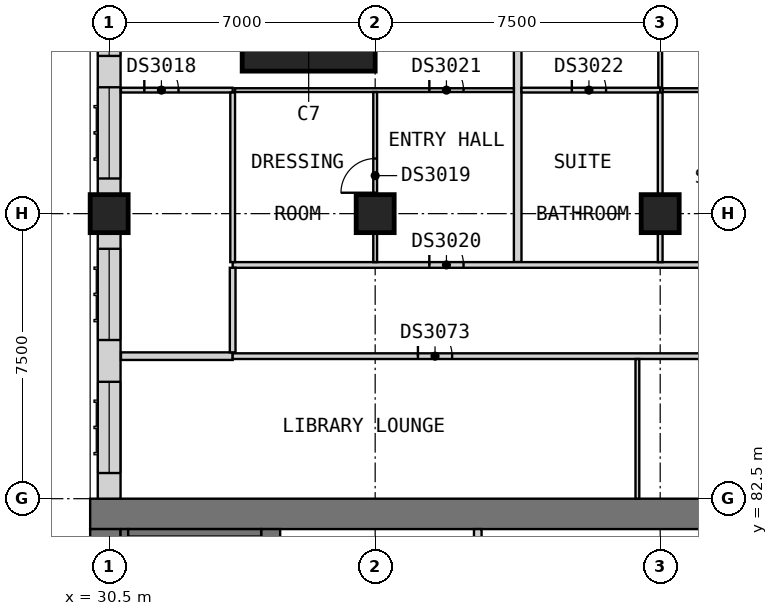
"""IFC4 building model, lengths in metres.
Left out: names, types, materials, properties, quantities, classifications, styles, units other than length and angle.
Written with IfcOpenShell. Run it as: python <this file> out.ifc"""

import sys

from ifc_helpers import new_model, si_unit, direction, frame, frame_2d, origin, origin_2d, place, context, subcontext, project, spatial, rectangle, extrude, element, fill, save


model = new_model("IFC4")
c1 = context("Model", 3, precision=1e-05, world=origin(), true_north=direction((0.0, 1.0)))
c2 = subcontext(c1, "Body", "Model", "MODEL_VIEW")
j1 = project(units=[si_unit("LENGTHUNIT", "METRE"), si_unit("PLANEANGLEUNIT", "RADIAN")], contexts=[c1])
p1 = place(None, origin())
s1 = spatial("IfcSite", under=j1, at=p1, CompositionType="ELEMENT")
p2 = place(p1, origin())
s2 = spatial("IfcBuilding", under=s1, at=p2, CompositionType="ELEMENT")
p3 = place(p2, frame((0.0, 0.0, 137.4)))
s3 = spatial("IfcBuildingStorey", under=s2, at=p3, CompositionType="ELEMENT", Elevation=137.4)
for number, where, z_axis, x_axis in (
    (1, (30.5, 90.0, 0.0), (0.0, 0.0, 1.0), (1.0, 0.0, 0.0)),
    (2, (37.5, 90.0, 0.0), (0.0, 0.0, 1.0), (1.0, 0.0, 0.0)),
    (3, (45.0, 90.0, 0.0), (0.0, 0.0, 1.0), (1.0, 0.0, 0.0)),
):
    element("IfcColumn", number, at=place(p3, frame(where, z_axis=z_axis, x_axis=x_axis)), inside=s3, PredefinedType="COLUMN", context=c2, shape_type="SweptSolid", body=[
        extrude(rectangle(XDim=1.0, YDim=1.0, at=origin_2d()), origin(), (0.0, 0.0, 1.0), 3.6),
    ])
p4 = place(p3, frame((35.75, 95.5, 0.0), z_axis=(0.0, 0.0, 1.0), x_axis=(1.0, 0.0, 0.0)))
e4 = element("IfcColumn", 4, at=p4, inside=s3, PredefinedType="COLUMN", context=c2, shape_type="SweptSolid", body=[
    extrude(rectangle(XDim=3.5, YDim=3.5, at=origin_2d()), origin(), (0.0, 0.0, 1.0), 3.6),
])
p5 = place(p3, frame((30.0, 82.1, 0.0), z_axis=(0.0, 0.0, 1.0), x_axis=(1.0, 0.0, 0.0)))
e5 = element("IfcWall", 5, at=p5, inside=s3, PredefinedType="SHEAR", context=c2, shape_type="SweptSolid", body=[
    extrude(rectangle(XDim=30.0, YDim=0.8, at=frame_2d((15.0, 0.0))), origin(), (0.0, 0.0, 1.0), 3.6),
])
p6 = place(p3, frame((30.4, 60.8, 0.0), z_axis=(0.0, 0.0, 1.0), x_axis=(0.0, 1.0, 0.0)))
e6 = element("IfcWall", 6, at=p6, inside=s3, PredefinedType="SHEAR", context=c2, shape_type="SweptSolid", body=[
    extrude(rectangle(XDim=20.9, YDim=0.8, at=frame_2d((10.45, 0.0))), origin(), (0.0, 0.0, 1.0), 3.6),
])
p7 = place(p3, frame((34.75, 78.3, 0.0), z_axis=(0.0, 0.0, 1.0), x_axis=(0.0, 1.0, 0.0)))
e7 = element("IfcWall", 7, at=p7, inside=s3, PredefinedType="SHEAR", context=c2, shape_type="SweptSolid", body=[
    extrude(rectangle(XDim=3.4, YDim=0.5, at=frame_2d((1.7, 0.0))), origin(), (0.0, 0.0, 1.0), 3.6),
])
p8 = place(p3, frame((30.5, 97.25, 0.0), z_axis=(0.0, 0.0, 1.0), x_axis=(0.0, -1.0, 0.0)))
e8 = element("IfcWall", 8, at=p8, inside=s3, PredefinedType="SOLIDWALL", context=c2, shape_type="SweptSolid", body=[
    extrude(rectangle(XDim=6.75, YDim=0.6, at=frame_2d((3.375, 0.0))), origin(), (0.0, 0.0, 1.0), 2.85),
])
p9 = place(p8, frame((3.925, 0.0, 0.8)))
e9 = element("IfcOpeningElement", 9, at=p9, cuts=e8, PredefinedType="OPENING", context=c2, shape_type="SweptSolid", body=[
    extrude(rectangle(XDim=2.4, YDim=1.8, at=frame_2d((1.2, 0.9))), frame((0.0, 0.31, 0.0), z_axis=(0.0, -1.0, 0.0), x_axis=(1.0, 0.0, 0.0)), (0.0, 0.0, 1.0), 0.62),
])
p10 = place(p8, frame((1.3, 0.0, 0.8)))
e10 = element("IfcOpeningElement", 10, at=p10, cuts=e8, PredefinedType="OPENING", context=c2, shape_type="SweptSolid", body=[
    extrude(rectangle(XDim=1.8, YDim=1.8, at=frame_2d((0.9, 0.9))), frame((0.0, 0.31, 0.0), z_axis=(0.0, -1.0, 0.0), x_axis=(1.0, 0.0, 0.0)), (0.0, 0.0, 1.0), 0.62),
])
p11 = place(p3, frame((30.5, 89.5, 0.0), z_axis=(0.0, 0.0, 1.0), x_axis=(0.0, -1.0, 0.0)))
e11 = element("IfcWall", 11, at=p11, inside=s3, PredefinedType="SOLIDWALL", context=c2, shape_type="SweptSolid", body=[
    extrude(rectangle(XDim=7.0, YDim=0.6, at=frame_2d((3.5, 0.0))), origin(), (0.0, 0.0, 1.0), 3.35),
])
p12 = place(p11, frame((3.925, 0.0, 0.8)))
e12 = element("IfcOpeningElement", 12, at=p12, cuts=e11, PredefinedType="OPENING", context=c2, shape_type="SweptSolid", body=[
    extrude(rectangle(XDim=2.4, YDim=1.8, at=frame_2d((1.2, 0.9))), frame((0.0, 0.31, 0.0), z_axis=(0.0, -1.0, 0.0), x_axis=(1.0, 0.0, 0.0)), (0.0, 0.0, 1.0), 0.62),
])
p13 = place(p11, frame((0.425, 0.0, 0.8)))
e13 = element("IfcOpeningElement", 13, at=p13, cuts=e11, PredefinedType="OPENING", context=c2, shape_type="SweptSolid", body=[
    extrude(rectangle(XDim=2.4, YDim=1.8, at=frame_2d((1.2, 0.9))), frame((0.0, 0.31, 0.0), z_axis=(0.0, -1.0, 0.0), x_axis=(1.0, 0.0, 0.0)), (0.0, 0.0, 1.0), 0.62),
])
p14 = place(p3, frame((40.2, 78.5, 0.0), z_axis=(0.0, 0.0, 1.0), x_axis=(0.0, 1.0, 0.0)))
e14 = element("IfcWall", 14, at=p14, inside=s3, PredefinedType="SOLIDWALL", context=c2, shape_type="SweptSolid", body=[
    extrude(rectangle(XDim=3.2, YDim=0.2, at=frame_2d((1.6, 0.0))), origin(), (0.0, 0.0, 1.0), 3.6),
])
p15 = place(p3, frame((30.9, 60.8, 0.0), z_axis=(0.0, 0.0, 1.0), x_axis=(0.0, 1.0, 0.0)))
e15 = element("IfcWall", 15, at=p15, inside=s3, PredefinedType="SOLIDWALL", context=c2, shape_type="SweptSolid", body=[
    extrude(rectangle(XDim=20.9, YDim=0.2, at=frame_2d((10.45, 0.0))), origin(), (0.0, 0.0, 1.0), 3.35),
])
p16 = place(p3, frame((31.0, 81.6, 0.0), z_axis=(0.0, 0.0, 1.0), x_axis=(1.0, 0.0, 0.0)))
e16 = element("IfcWall", 16, at=p16, inside=s3, PredefinedType="SOLIDWALL", context=c2, shape_type="SweptSolid", body=[
    extrude(rectangle(XDim=3.5, YDim=0.2, at=frame_2d((1.75, 0.0))), origin(), (0.0, 0.0, 1.0), 3.35),
])
p17 = place(p3, frame((30.81, 86.25, 0.0), z_axis=(0.0, 0.0, 1.0), x_axis=(1.0, 0.0, 0.0)))
e17 = element("IfcWall", 17, at=p17, inside=s3, PredefinedType="PARTITIONING", context=c2, shape_type="SweptSolid", body=[
    extrude(rectangle(XDim=2.94, YDim=0.2, at=frame_2d((1.47, 0.0))), origin(), (0.0, 0.0, 1.0), 3.35),
])
p18 = place(p3, frame((41.25, 88.725, 0.0), z_axis=(0.0, 0.0, 1.0), x_axis=(0.0, 1.0, 0.0)))
e18 = element("IfcWall", 18, at=p18, inside=s3, PredefinedType="PARTITIONING", context=c2, shape_type="SweptSolid", body=[
    extrude(rectangle(XDim=11.715, YDim=0.2, at=frame_2d((5.857, 0.0))), origin(), (0.0, 0.0, 1.0), 3.35),
])
p19 = place(p3, frame((33.75, 86.25, 0.0), z_axis=(0.0, 0.0, 1.0), x_axis=(1.0, 0.0, 0.0)))
e19 = element("IfcWall", 19, at=p19, inside=s3, PredefinedType="PARTITIONING", context=c2, shape_type="SweptSolid", body=[
    extrude(rectangle(XDim=37.5, YDim=0.15, at=frame_2d((18.75, 0.0))), origin(), (0.0, 0.0, 1.0), 3.35),
])
p20 = place(p19, frame((4.875, 0.0, 0.0)))
e20 = element("IfcOpeningElement", 20, at=p20, cuts=e19, PredefinedType="OPENING", context=c2, shape_type="SweptSolid", body=[
    extrude(rectangle(XDim=0.9, YDim=2.1, at=frame_2d((0.45, 1.05))), frame((0.0, 0.085, 0.0), z_axis=(0.0, -1.0, 0.0), x_axis=(1.0, 0.0, 0.0)), (0.0, 0.0, 1.0), 0.17),
])
p21 = place(p3, frame((33.75, 88.65, 0.0), z_axis=(0.0, 0.0, 1.0), x_axis=(1.0, 0.0, 0.0)))
e21 = element("IfcWall", 21, at=p21, inside=s3, PredefinedType="PARTITIONING", context=c2, shape_type="SweptSolid", body=[
    extrude(rectangle(XDim=39.9, YDim=0.15, at=frame_2d((19.95, 0.0))), origin(), (0.0, 0.0, 1.0), 3.35),
])
p22 = place(p21, frame((5.175, 0.0, 0.0)))
e22 = element("IfcOpeningElement", 22, at=p22, cuts=e21, PredefinedType="OPENING", context=c2, shape_type="SweptSolid", body=[
    extrude(rectangle(XDim=0.9, YDim=2.1, at=frame_2d((0.45, 1.05))), frame((0.0, 0.085, 0.0), z_axis=(0.0, -1.0, 0.0), x_axis=(1.0, 0.0, 0.0)), (0.0, 0.0, 1.0), 0.17),
])
p23 = place(p21, frame((13.05, 0.0, 0.0)))
e23 = element("IfcOpeningElement", 23, at=p23, cuts=e21, PredefinedType="OPENING", context=c2, shape_type="SweptSolid", body=[
    extrude(rectangle(XDim=0.9, YDim=2.1, at=frame_2d((0.45, 1.05))), frame((0.0, 0.085, 0.0), z_axis=(0.0, -1.0, 0.0), x_axis=(1.0, 0.0, 0.0)), (0.0, 0.0, 1.0), 0.17),
])
p24 = place(p21, frame((28.05, 0.0, 0.0)))
e24 = element("IfcOpeningElement", 24, at=p24, cuts=e21, PredefinedType="OPENING", context=c2, shape_type="SweptSolid", body=[
    extrude(rectangle(XDim=0.9, YDim=2.1, at=frame_2d((0.45, 1.05))), frame((0.0, 0.085, 0.0), z_axis=(0.0, -1.0, 0.0), x_axis=(1.0, 0.0, 0.0)), (0.0, 0.0, 1.0), 0.17),
])
p25 = place(p21, frame((32.262, 0.0, 0.0)))
e25 = element("IfcOpeningElement", 25, at=p25, cuts=e21, PredefinedType="OPENING", context=c2, shape_type="SweptSolid", body=[
    extrude(rectangle(XDim=0.9, YDim=2.1, at=frame_2d((0.45, 1.05))), frame((0.0, 0.085, 0.0), z_axis=(0.0, -1.0, 0.0), x_axis=(1.0, 0.0, 0.0)), (0.0, 0.0, 1.0), 0.17),
])
p26 = place(p21, frame((36.113, 0.0, 0.0)))
e26 = element("IfcOpeningElement", 26, at=p26, cuts=e21, PredefinedType="OPENING", context=c2, shape_type="SweptSolid", body=[
    extrude(rectangle(XDim=0.9, YDim=2.1, at=frame_2d((0.45, 1.05))), frame((0.0, 0.085, 0.0), z_axis=(0.0, -1.0, 0.0), x_axis=(1.0, 0.0, 0.0)), (0.0, 0.0, 1.0), 0.17),
])
p27 = place(p21, frame((38.25, 0.0, 0.0)))
e27 = element("IfcOpeningElement", 27, at=p27, cuts=e21, PredefinedType="OPENING", context=c2, shape_type="SweptSolid", body=[
    extrude(rectangle(XDim=0.9, YDim=2.1, at=frame_2d((0.45, 1.05))), frame((0.0, 0.085, 0.0), z_axis=(0.0, -1.0, 0.0), x_axis=(1.0, 0.0, 0.0)), (0.0, 0.0, 1.0), 0.17),
])
p28 = place(p3, frame((33.75, 86.35, 0.0), z_axis=(0.0, 0.0, 1.0), x_axis=(0.0, 1.0, 0.0)))
e28 = element("IfcWall", 28, at=p28, inside=s3, PredefinedType="PARTITIONING", context=c2, shape_type="SweptSolid", body=[
    extrude(rectangle(XDim=2.225, YDim=0.15, at=frame_2d((1.112, 0.0))), origin(), (0.0, 0.0, 1.0), 3.35),
])
p29 = place(p3, frame((33.812, 93.25, 0.0), z_axis=(0.0, 0.0, 1.0), x_axis=(1.0, 0.0, 0.0)))
e29 = element("IfcWall", 29, at=p29, inside=s3, PredefinedType="PARTITIONING", context=c2, shape_type="SweptSolid", body=[
    extrude(rectangle(XDim=7.337, YDim=0.1, at=frame_2d((3.669, 0.0))), origin(), (0.0, 0.0, 1.0), 3.35),
])
p30 = place(p29, frame((5.113, 0.0, 0.0)))
e30 = element("IfcOpeningElement", 30, at=p30, cuts=e29, PredefinedType="OPENING", context=c2, shape_type="SweptSolid", body=[
    extrude(rectangle(XDim=0.9, YDim=2.1, at=frame_2d((0.45, 1.05))), frame((0.0, 0.06, 0.0), z_axis=(0.0, -1.0, 0.0), x_axis=(1.0, 0.0, 0.0)), (0.0, 0.0, 1.0), 0.12),
])
p31 = place(p3, frame((45.062, 93.25, 0.0), z_axis=(0.0, 0.0, 1.0), x_axis=(1.0, 0.0, 0.0)))
e31 = element("IfcWall", 31, at=p31, inside=s3, PredefinedType="PARTITIONING", context=c2, shape_type="SweptSolid", body=[
    extrude(rectangle(XDim=4.375, YDim=0.1, at=frame_2d((2.188, 0.0))), origin(), (0.0, 0.0, 1.0), 3.35),
])
p32 = place(p31, frame((1.738, 0.0, 0.0)))
e32 = element("IfcOpeningElement", 32, at=p32, cuts=e31, PredefinedType="OPENING", context=c2, shape_type="SweptSolid", body=[
    extrude(rectangle(XDim=0.9, YDim=2.1, at=frame_2d((0.45, 1.05))), frame((0.0, 0.06, 0.0), z_axis=(0.0, -1.0, 0.0), x_axis=(1.0, 0.0, 0.0)), (0.0, 0.0, 1.0), 0.12),
])
p33 = place(p3, frame((37.5, 88.725, 0.0), z_axis=(0.0, 0.0, 1.0), x_axis=(0.0, 1.0, 0.0)))
e33 = element("IfcWall", 33, at=p33, inside=s3, PredefinedType="PARTITIONING", context=c2, shape_type="SweptSolid", body=[
    extrude(rectangle(XDim=4.475, YDim=0.1, at=frame_2d((2.237, 0.0))), origin(), (0.0, 0.0, 1.0), 3.35),
])
p34 = place(p33, frame((1.825, 0.0, 0.0)))
e34 = element("IfcOpeningElement", 34, at=p34, cuts=e33, PredefinedType="OPENING", context=c2, shape_type="SweptSolid", body=[
    extrude(rectangle(XDim=0.9, YDim=2.1, at=frame_2d((0.45, 1.05))), frame((0.0, 0.06, 0.0), z_axis=(0.0, -1.0, 0.0), x_axis=(1.0, 0.0, 0.0)), (0.0, 0.0, 1.0), 0.12),
])
p35 = place(p3, frame((44.4, 82.5, 0.0), z_axis=(0.0, 0.0, 1.0), x_axis=(0.0, 1.0, 0.0)))
e35 = element("IfcWall", 35, at=p35, inside=s3, PredefinedType="PARTITIONING", context=c2, shape_type="SweptSolid", body=[
    extrude(rectangle(XDim=3.675, YDim=0.1, at=frame_2d((1.837, 0.0))), origin(), (0.0, 0.0, 1.0), 3.35),
])
p36 = place(p3, frame((45.0, 93.312, 0.0), z_axis=(0.0, 0.0, 1.0), x_axis=(0.0, 1.0, 0.0)))
e36 = element("IfcWall", 36, at=p36, inside=s3, PredefinedType="PARTITIONING", context=c2, shape_type="SweptSolid", body=[
    extrude(rectangle(XDim=7.938, YDim=0.1, at=frame_2d((3.969, 0.0))), origin(), (0.0, 0.0, 1.0), 3.35),
])
p37 = place(p36, frame((4.238, 0.0, 0.0)))
e37 = element("IfcOpeningElement", 37, at=p37, cuts=e36, PredefinedType="OPENING", context=c2, shape_type="SweptSolid", body=[
    extrude(rectangle(XDim=0.9, YDim=2.1, at=frame_2d((0.45, 1.05))), frame((0.0, 0.06, 0.0), z_axis=(0.0, -1.0, 0.0), x_axis=(1.0, 0.0, 0.0)), (0.0, 0.0, 1.0), 0.12),
])
p38 = place(p3, frame((30.81, 93.25, 0.0), z_axis=(0.0, 0.0, 1.0), x_axis=(1.0, 0.0, 0.0)))
e38 = element("IfcWall", 38, at=p38, inside=s3, PredefinedType="PARTITIONING", context=c2, shape_type="SweptSolid", body=[
    extrude(rectangle(XDim=2.94, YDim=0.125, at=frame_2d((1.47, 0.0))), origin(), (0.0, 0.0, 1.0), 3.35),
])
p39 = place(p38, frame((0.615, 0.0, 0.0)))
e39 = element("IfcOpeningElement", 39, at=p39, cuts=e38, PredefinedType="OPENING", context=c2, shape_type="SweptSolid", body=[
    extrude(rectangle(XDim=0.9, YDim=2.1, at=frame_2d((0.45, 1.05))), frame((0.0, 0.073, 0.0), z_axis=(0.0, -1.0, 0.0), x_axis=(1.0, 0.0, 0.0)), (0.0, 0.0, 1.0), 0.145),
])
p40 = place(p3, frame((41.35, 93.25, 0.0), z_axis=(0.0, 0.0, 1.0), x_axis=(1.0, 0.0, 0.0)))
e40 = element("IfcWall", 40, at=p40, inside=s3, PredefinedType="PARTITIONING", context=c2, shape_type="SweptSolid", body=[
    extrude(rectangle(XDim=3.65, YDim=0.125, at=frame_2d((1.825, 0.0))), origin(), (0.0, 0.0, 1.0), 3.35),
])
p41 = place(p40, frame((1.325, 0.0, 0.0)))
e41 = element("IfcOpeningElement", 41, at=p41, cuts=e40, PredefinedType="OPENING", context=c2, shape_type="SweptSolid", body=[
    extrude(rectangle(XDim=0.9, YDim=2.1, at=frame_2d((0.45, 1.05))), frame((0.0, 0.073, 0.0), z_axis=(0.0, -1.0, 0.0), x_axis=(1.0, 0.0, 0.0)), (0.0, 0.0, 1.0), 0.145),
])
for number, where, z_axis, x_axis in (
    (42, (33.75, 88.725, 0.0), (0.0, 0.0, 1.0), (0.0, 1.0, 0.0)),
    (43, (45.0, 88.725, 0.0), (0.0, 0.0, 1.0), (0.0, 1.0, 0.0)),
):
    element("IfcWall", number, at=place(p3, frame(where, z_axis=z_axis, x_axis=x_axis)), inside=s3, PredefinedType="PARTITIONING", context=c2, shape_type="SweptSolid", body=[
        extrude(rectangle(XDim=4.462, YDim=0.125, at=frame_2d((2.231, 0.0))), origin(), (0.0, 0.0, 1.0), 3.35),
    ])
p42 = place(p9, origin())
e44 = element("IfcWindow", 44, at=p42, inside=s3, PartitioningType="SINGLE_PANEL", PredefinedType="WINDOW", context=c2, shape_type="SweptSolid", body=[
    extrude(rectangle(XDim=2.4, YDim=1.8, at=frame_2d((1.2, 0.9))), frame((0.0, -0.07, 0.0), z_axis=(0.0, -1.0, 0.0), x_axis=(1.0, 0.0, 0.0)), (0.0, 0.0, 1.0), 0.06),
])
fill(e9, e44)
p43 = place(p10, origin())
e45 = element("IfcWindow", 45, at=p43, inside=s3, PartitioningType="SINGLE_PANEL", PredefinedType="WINDOW", context=c2, shape_type="SweptSolid", body=[
    extrude(rectangle(XDim=1.8, YDim=1.8, at=frame_2d((0.9, 0.9))), frame((0.0, -0.07, 0.0), z_axis=(0.0, -1.0, 0.0), x_axis=(1.0, 0.0, 0.0)), (0.0, 0.0, 1.0), 0.06),
])
fill(e10, e45)
p44 = place(p12, origin())
e46 = element("IfcWindow", 46, at=p44, inside=s3, PartitioningType="SINGLE_PANEL", PredefinedType="WINDOW", context=c2, shape_type="SweptSolid", body=[
    extrude(rectangle(XDim=2.4, YDim=1.8, at=frame_2d((1.2, 0.9))), frame((0.0, -0.07, 0.0), z_axis=(0.0, -1.0, 0.0), x_axis=(1.0, 0.0, 0.0)), (0.0, 0.0, 1.0), 0.06),
])
fill(e12, e46)
p45 = place(p13, origin())
e47 = element("IfcWindow", 47, at=p45, inside=s3, PartitioningType="SINGLE_PANEL", PredefinedType="WINDOW", context=c2, shape_type="SweptSolid", body=[
    extrude(rectangle(XDim=2.4, YDim=1.8, at=frame_2d((1.2, 0.9))), frame((0.0, -0.07, 0.0), z_axis=(0.0, -1.0, 0.0), x_axis=(1.0, 0.0, 0.0)), (0.0, 0.0, 1.0), 0.06),
])
fill(e13, e47)
p46 = place(p39, origin())
e48 = element("IfcDoor", 48, at=p46, inside=s3, OperationType="SINGLE_SWING_RIGHT", PredefinedType="DOOR", context=c2, shape_type="SweptSolid", body=[
    extrude(rectangle(XDim=0.9, YDim=2.1, at=frame_2d((0.45, 1.05))), frame((0.0, 0.025, 0.0), z_axis=(0.0, -1.0, 0.0), x_axis=(1.0, 0.0, 0.0)), (0.0, 0.0, 1.0), 0.05),
])
fill(e39, e48)
p47 = place(p34, origin())
e49 = element("IfcDoor", 49, at=p47, inside=s3, OperationType="SINGLE_SWING_RIGHT", PredefinedType="DOOR", context=c2, shape_type="SweptSolid", body=[
    extrude(rectangle(XDim=0.9, YDim=2.1, at=frame_2d((0.45, 1.05))), frame((0.0, 0.025, 0.0), z_axis=(0.0, -1.0, 0.0), x_axis=(1.0, 0.0, 0.0)), (0.0, 0.0, 1.0), 0.05),
])
fill(e34, e49)
p48 = place(p22, origin())
e50 = element("IfcDoor", 50, at=p48, inside=s3, OperationType="SINGLE_SWING_LEFT", PredefinedType="DOOR", context=c2, shape_type="SweptSolid", body=[
    extrude(rectangle(XDim=0.9, YDim=2.1, at=frame_2d((0.45, 1.05))), frame((0.0, 0.025, 0.0), z_axis=(0.0, -1.0, 0.0), x_axis=(1.0, 0.0, 0.0)), (0.0, 0.0, 1.0), 0.05),
])
fill(e22, e50)
p49 = place(p30, origin())
e51 = element("IfcDoor", 51, at=p49, inside=s3, OperationType="SINGLE_SWING_RIGHT", PredefinedType="DOOR", context=c2, shape_type="SweptSolid", body=[
    extrude(rectangle(XDim=0.9, YDim=2.1, at=frame_2d((0.45, 1.05))), frame((0.0, 0.025, 0.0), z_axis=(0.0, -1.0, 0.0), x_axis=(1.0, 0.0, 0.0)), (0.0, 0.0, 1.0), 0.05),
])
fill(e30, e51)
p50 = place(p41, origin())
e52 = element("IfcDoor", 52, at=p50, inside=s3, OperationType="SINGLE_SWING_RIGHT", PredefinedType="DOOR", context=c2, shape_type="SweptSolid", body=[
    extrude(rectangle(XDim=0.9, YDim=2.1, at=frame_2d((0.45, 1.05))), frame((0.0, 0.025, 0.0), z_axis=(0.0, -1.0, 0.0), x_axis=(1.0, 0.0, 0.0)), (0.0, 0.0, 1.0), 0.05),
])
fill(e41, e52)
p51 = place(p20, origin())
e53 = element("IfcDoor", 53, at=p51, inside=s3, OperationType="SINGLE_SWING_RIGHT", PredefinedType="DOOR", context=c2, shape_type="SweptSolid", body=[
    extrude(rectangle(XDim=0.9, YDim=2.1, at=frame_2d((0.45, 1.05))), frame((0.0, 0.025, 0.0), z_axis=(0.0, -1.0, 0.0), x_axis=(1.0, 0.0, 0.0)), (0.0, 0.0, 1.0), 0.05),
])
fill(e20, e53)
save(model, sys.argv[1])
